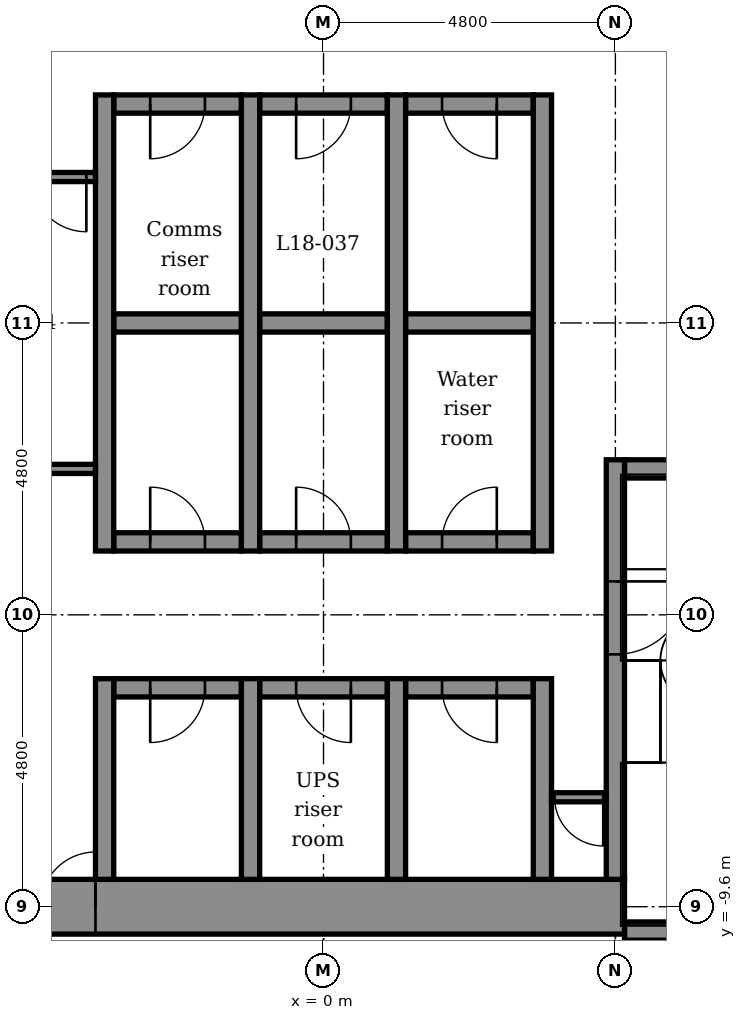
"""IFC4 building model, lengths in metres.
Left out: names, types, materials, properties, quantities, classifications, styles, units other than length and angle.
Written with IfcOpenShell. Run it as: python <this file> out.ifc"""

import sys

from ifc_helpers import new_model, si_unit, direction, frame, frame_2d, origin, place, context, subcontext, project, spatial, rectangle, extrude, element, fill, save


model = new_model("IFC4")
c1 = context("Model", 3, precision=1e-05, world=origin(), true_north=direction((0.0, 1.0)))
c2 = subcontext(c1, "Body", "Model", "MODEL_VIEW")
j1 = project(units=[si_unit("LENGTHUNIT", "METRE"), si_unit("PLANEANGLEUNIT", "RADIAN")], contexts=[c1])
p1 = place(None, origin())
s1 = spatial("IfcSite", under=j1, at=p1, CompositionType="ELEMENT")
p2 = place(p1, origin())
s2 = spatial("IfcBuilding", under=s1, at=p2, CompositionType="ELEMENT")
p3 = place(p2, frame((0.0, 0.0, 95.9)))
s3 = spatial("IfcBuildingStorey", under=s2, at=p3, CompositionType="ELEMENT", Elevation=95.9)
p4 = place(p3, frame((4.95, -10.0, -0.2), z_axis=(0.0, 0.0, 1.0), x_axis=(1.0, 0.0, 0.0)))
e1 = element("IfcWall", 1, at=p4, inside=s3, PredefinedType="STANDARD", context=c2, shape_type="SweptSolid", body=[
    extrude(rectangle(XDim=4.2, YDim=0.3, at=frame_2d((2.1, 0.0))), origin(), (0.0, 0.0, 1.0), 4.5),
])
p5 = place(p3, frame((-5.25, -9.6, -0.2), z_axis=(0.0, 0.0, 1.0), x_axis=(1.0, 0.0, 0.0)))
e2 = element("IfcWall", 2, at=p5, inside=s3, PredefinedType="SHEAR", context=c2, shape_type="SweptSolid", body=[
    extrude(rectangle(XDim=10.2, YDim=0.9, at=frame_2d((5.1, 0.0))), origin(), (0.0, 0.0, 1.0), 4.5),
])
p6 = place(p5, frame((0.6, 0.0, 0.2)))
e3 = element("IfcOpeningElement", 3, at=p6, cuts=e2, PredefinedType="OPENING", context=c2, shape_type="SweptSolid", body=[
    extrude(rectangle(XDim=0.9, YDim=2.1, at=frame_2d((0.45, 1.05))), frame((0.0, 0.46, 0.0), z_axis=(0.0, -1.0, 0.0), x_axis=(1.0, 0.0, 0.0)), (0.0, 0.0, 1.0), 0.92),
])
p7 = place(p3, frame((-3.45, -6.0, -0.2), z_axis=(0.0, 0.0, 1.0), x_axis=(1.0, 0.0, 0.0)))
e4 = element("IfcWall", 4, at=p7, inside=s3, PredefinedType="STANDARD", context=c2, shape_type="SweptSolid", body=[
    extrude(rectangle(XDim=2.1, YDim=0.3, at=frame_2d((1.05, 0.0))), origin(), (0.0, 0.0, 1.0), 4.5),
])
p8 = place(p7, frame((0.6, 0.0, 0.2)))
e5 = element("IfcOpeningElement", 5, at=p8, cuts=e4, PredefinedType="OPENING", context=c2, shape_type="SweptSolid", body=[
    extrude(rectangle(XDim=0.9, YDim=2.1, at=frame_2d((0.45, 1.05))), frame((0.0, 0.16, 0.0), z_axis=(0.0, -1.0, 0.0), x_axis=(1.0, 0.0, 0.0)), (0.0, 0.0, 1.0), 0.32),
])
p9 = place(p3, frame((-1.05, -6.0, -0.2), z_axis=(0.0, 0.0, 1.0), x_axis=(1.0, 0.0, 0.0)))
e6 = element("IfcWall", 6, at=p9, inside=s3, PredefinedType="STANDARD", context=c2, shape_type="SweptSolid", body=[
    extrude(rectangle(XDim=2.1, YDim=0.3, at=frame_2d((1.05, 0.0))), origin(), (0.0, 0.0, 1.0), 4.5),
])
p10 = place(p9, frame((0.6, 0.0, 0.2)))
e7 = element("IfcOpeningElement", 7, at=p10, cuts=e6, PredefinedType="OPENING", context=c2, shape_type="SweptSolid", body=[
    extrude(rectangle(XDim=0.9, YDim=2.1, at=frame_2d((0.45, 1.05))), frame((0.0, 0.16, 0.0), z_axis=(0.0, -1.0, 0.0), x_axis=(1.0, 0.0, 0.0)), (0.0, 0.0, 1.0), 0.32),
])
p11 = place(p3, frame((1.35, -6.0, -0.2), z_axis=(0.0, 0.0, 1.0), x_axis=(1.0, 0.0, 0.0)))
e8 = element("IfcWall", 8, at=p11, inside=s3, PredefinedType="STANDARD", context=c2, shape_type="SweptSolid", body=[
    extrude(rectangle(XDim=2.1, YDim=0.3, at=frame_2d((1.05, 0.0))), origin(), (0.0, 0.0, 1.0), 4.5),
])
p12 = place(p11, frame((0.6, 0.0, 0.2)))
e9 = element("IfcOpeningElement", 9, at=p12, cuts=e8, PredefinedType="OPENING", context=c2, shape_type="SweptSolid", body=[
    extrude(rectangle(XDim=0.9, YDim=2.1, at=frame_2d((0.45, 1.05))), frame((0.0, 0.16, 0.0), z_axis=(0.0, -1.0, 0.0), x_axis=(1.0, 0.0, 0.0)), (0.0, 0.0, 1.0), 0.32),
])
p13 = place(p3, frame((-3.45, -3.6, -0.2), z_axis=(0.0, 0.0, 1.0), x_axis=(1.0, 0.0, 0.0)))
e10 = element("IfcWall", 10, at=p13, inside=s3, PredefinedType="STANDARD", context=c2, shape_type="SweptSolid", body=[
    extrude(rectangle(XDim=2.1, YDim=0.3, at=frame_2d((1.05, 0.0))), origin(), (0.0, 0.0, 1.0), 4.5),
])
p14 = place(p13, frame((0.6, 0.0, 0.2)))
e11 = element("IfcOpeningElement", 11, at=p14, cuts=e10, PredefinedType="OPENING", context=c2, shape_type="SweptSolid", body=[
    extrude(rectangle(XDim=0.9, YDim=2.1, at=frame_2d((0.45, 1.05))), frame((0.0, 0.16, 0.0), z_axis=(0.0, -1.0, 0.0), x_axis=(1.0, 0.0, 0.0)), (0.0, 0.0, 1.0), 0.32),
])
p15 = place(p3, frame((-1.05, -3.6, -0.2), z_axis=(0.0, 0.0, 1.0), x_axis=(1.0, 0.0, 0.0)))
e12 = element("IfcWall", 12, at=p15, inside=s3, PredefinedType="STANDARD", context=c2, shape_type="SweptSolid", body=[
    extrude(rectangle(XDim=2.1, YDim=0.3, at=frame_2d((1.05, 0.0))), origin(), (0.0, 0.0, 1.0), 4.5),
])
p16 = place(p15, frame((0.6, 0.0, 0.2)))
e13 = element("IfcOpeningElement", 13, at=p16, cuts=e12, PredefinedType="OPENING", context=c2, shape_type="SweptSolid", body=[
    extrude(rectangle(XDim=0.9, YDim=2.1, at=frame_2d((0.45, 1.05))), frame((0.0, 0.16, 0.0), z_axis=(0.0, -1.0, 0.0), x_axis=(1.0, 0.0, 0.0)), (0.0, 0.0, 1.0), 0.32),
])
p17 = place(p3, frame((1.35, -3.6, -0.2), z_axis=(0.0, 0.0, 1.0), x_axis=(1.0, 0.0, 0.0)))
e14 = element("IfcWall", 14, at=p17, inside=s3, PredefinedType="STANDARD", context=c2, shape_type="SweptSolid", body=[
    extrude(rectangle(XDim=2.1, YDim=0.3, at=frame_2d((1.05, 0.0))), origin(), (0.0, 0.0, 1.0), 4.5),
])
p18 = place(p17, frame((0.6, 0.0, 0.2)))
e15 = element("IfcOpeningElement", 15, at=p18, cuts=e14, PredefinedType="OPENING", context=c2, shape_type="SweptSolid", body=[
    extrude(rectangle(XDim=0.9, YDim=2.1, at=frame_2d((0.45, 1.05))), frame((0.0, 0.16, 0.0), z_axis=(0.0, -1.0, 0.0), x_axis=(1.0, 0.0, 0.0)), (0.0, 0.0, 1.0), 0.32),
])
p19 = place(p3, frame((4.95, -2.4, -0.2), z_axis=(0.0, 0.0, 1.0), x_axis=(1.0, 0.0, 0.0)))
e16 = element("IfcWall", 16, at=p19, inside=s3, PredefinedType="STANDARD", context=c2, shape_type="SweptSolid", body=[
    extrude(rectangle(XDim=0.9, YDim=0.3, at=frame_2d((0.45, 0.0))), origin(), (0.0, 0.0, 1.0), 4.5),
])
p20 = place(p3, frame((-3.45, 0.0, -0.2), z_axis=(0.0, 0.0, 1.0), x_axis=(1.0, 0.0, 0.0)))
e17 = element("IfcWall", 17, at=p20, inside=s3, PredefinedType="STANDARD", context=c2, shape_type="SweptSolid", body=[
    extrude(rectangle(XDim=2.1, YDim=0.3, at=frame_2d((1.05, 0.0))), origin(), (0.0, 0.0, 1.0), 4.5),
])
p21 = place(p3, frame((-1.05, 0.0, -0.2), z_axis=(0.0, 0.0, 1.0), x_axis=(1.0, 0.0, 0.0)))
e18 = element("IfcWall", 18, at=p21, inside=s3, PredefinedType="STANDARD", context=c2, shape_type="SweptSolid", body=[
    extrude(rectangle(XDim=2.1, YDim=0.3, at=frame_2d((1.05, 0.0))), origin(), (0.0, 0.0, 1.0), 4.5),
])
p22 = place(p3, frame((1.35, 0.0, -0.2), z_axis=(0.0, 0.0, 1.0), x_axis=(1.0, 0.0, 0.0)))
e19 = element("IfcWall", 19, at=p22, inside=s3, PredefinedType="STANDARD", context=c2, shape_type="SweptSolid", body=[
    extrude(rectangle(XDim=2.1, YDim=0.3, at=frame_2d((1.05, 0.0))), origin(), (0.0, 0.0, 1.0), 4.5),
])
p23 = place(p3, frame((-3.45, 3.6, -0.2), z_axis=(0.0, 0.0, 1.0), x_axis=(1.0, 0.0, 0.0)))
e20 = element("IfcWall", 20, at=p23, inside=s3, PredefinedType="STANDARD", context=c2, shape_type="SweptSolid", body=[
    extrude(rectangle(XDim=2.1, YDim=0.3, at=frame_2d((1.05, 0.0))), origin(), (0.0, 0.0, 1.0), 4.5),
])
p24 = place(p23, frame((0.6, 0.0, 0.2)))
e21 = element("IfcOpeningElement", 21, at=p24, cuts=e20, PredefinedType="OPENING", context=c2, shape_type="SweptSolid", body=[
    extrude(rectangle(XDim=0.9, YDim=2.1, at=frame_2d((0.45, 1.05))), frame((0.0, 0.16, 0.0), z_axis=(0.0, -1.0, 0.0), x_axis=(1.0, 0.0, 0.0)), (0.0, 0.0, 1.0), 0.32),
])
p25 = place(p3, frame((-1.05, 3.6, -0.2), z_axis=(0.0, 0.0, 1.0), x_axis=(1.0, 0.0, 0.0)))
e22 = element("IfcWall", 22, at=p25, inside=s3, PredefinedType="STANDARD", context=c2, shape_type="SweptSolid", body=[
    extrude(rectangle(XDim=2.1, YDim=0.3, at=frame_2d((1.05, 0.0))), origin(), (0.0, 0.0, 1.0), 4.5),
])
p26 = place(p25, frame((0.6, 0.0, 0.2)))
e23 = element("IfcOpeningElement", 23, at=p26, cuts=e22, PredefinedType="OPENING", context=c2, shape_type="SweptSolid", body=[
    extrude(rectangle(XDim=0.9, YDim=2.1, at=frame_2d((0.45, 1.05))), frame((0.0, 0.16, 0.0), z_axis=(0.0, -1.0, 0.0), x_axis=(1.0, 0.0, 0.0)), (0.0, 0.0, 1.0), 0.32),
])
p27 = place(p3, frame((1.35, 3.6, -0.2), z_axis=(0.0, 0.0, 1.0), x_axis=(1.0, 0.0, 0.0)))
e24 = element("IfcWall", 24, at=p27, inside=s3, PredefinedType="STANDARD", context=c2, shape_type="SweptSolid", body=[
    extrude(rectangle(XDim=2.1, YDim=0.3, at=frame_2d((1.05, 0.0))), origin(), (0.0, 0.0, 1.0), 4.5),
])
p28 = place(p27, frame((0.6, 0.0, 0.2)))
e25 = element("IfcOpeningElement", 25, at=p28, cuts=e24, PredefinedType="OPENING", context=c2, shape_type="SweptSolid", body=[
    extrude(rectangle(XDim=0.9, YDim=2.1, at=frame_2d((0.45, 1.05))), frame((0.0, 0.16, 0.0), z_axis=(0.0, -1.0, 0.0), x_axis=(1.0, 0.0, 0.0)), (0.0, 0.0, 1.0), 0.32),
])
p29 = place(p3, frame((-3.6, -9.15, -0.2), z_axis=(0.0, 0.0, 1.0), x_axis=(0.0, 1.0, 0.0)))
e26 = element("IfcWall", 26, at=p29, inside=s3, PredefinedType="STANDARD", context=c2, shape_type="SweptSolid", body=[
    extrude(rectangle(XDim=3.3, YDim=0.3, at=frame_2d((1.65, 0.0))), origin(), (0.0, 0.0, 1.0), 4.5),
])
p30 = place(p3, frame((-3.6, -3.75, -0.2), z_axis=(0.0, 0.0, 1.0), x_axis=(0.0, 1.0, 0.0)))
e27 = element("IfcWall", 27, at=p30, inside=s3, PredefinedType="STANDARD", context=c2, shape_type="SweptSolid", body=[
    extrude(rectangle(XDim=7.5, YDim=0.3, at=frame_2d((3.75, 0.0))), origin(), (0.0, 0.0, 1.0), 4.5),
])
p31 = place(p3, frame((-1.2, -9.15, -0.2), z_axis=(0.0, 0.0, 1.0), x_axis=(0.0, 1.0, 0.0)))
e28 = element("IfcWall", 28, at=p31, inside=s3, PredefinedType="STANDARD", context=c2, shape_type="SweptSolid", body=[
    extrude(rectangle(XDim=3.3, YDim=0.3, at=frame_2d((1.65, 0.0))), origin(), (0.0, 0.0, 1.0), 4.5),
])
p32 = place(p3, frame((-1.2, -3.75, -0.2), z_axis=(0.0, 0.0, 1.0), x_axis=(0.0, 1.0, 0.0)))
e29 = element("IfcWall", 29, at=p32, inside=s3, PredefinedType="STANDARD", context=c2, shape_type="SweptSolid", body=[
    extrude(rectangle(XDim=7.5, YDim=0.3, at=frame_2d((3.75, 0.0))), origin(), (0.0, 0.0, 1.0), 4.5),
])
p33 = place(p3, frame((1.2, -9.15, -0.2), z_axis=(0.0, 0.0, 1.0), x_axis=(0.0, 1.0, 0.0)))
e30 = element("IfcWall", 30, at=p33, inside=s3, PredefinedType="STANDARD", context=c2, shape_type="SweptSolid", body=[
    extrude(rectangle(XDim=3.3, YDim=0.3, at=frame_2d((1.65, 0.0))), origin(), (0.0, 0.0, 1.0), 4.5),
])
p34 = place(p3, frame((1.2, -3.75, -0.2), z_axis=(0.0, 0.0, 1.0), x_axis=(0.0, 1.0, 0.0)))
e31 = element("IfcWall", 31, at=p34, inside=s3, PredefinedType="STANDARD", context=c2, shape_type="SweptSolid", body=[
    extrude(rectangle(XDim=7.5, YDim=0.3, at=frame_2d((3.75, 0.0))), origin(), (0.0, 0.0, 1.0), 4.5),
])
p35 = place(p3, frame((3.6, -9.15, -0.2), z_axis=(0.0, 0.0, 1.0), x_axis=(0.0, 1.0, 0.0)))
e32 = element("IfcWall", 32, at=p35, inside=s3, PredefinedType="STANDARD", context=c2, shape_type="SweptSolid", body=[
    extrude(rectangle(XDim=3.3, YDim=0.3, at=frame_2d((1.65, 0.0))), origin(), (0.0, 0.0, 1.0), 4.5),
])
p36 = place(p3, frame((3.6, -3.75, -0.2), z_axis=(0.0, 0.0, 1.0), x_axis=(0.0, 1.0, 0.0)))
e33 = element("IfcWall", 33, at=p36, inside=s3, PredefinedType="STANDARD", context=c2, shape_type="SweptSolid", body=[
    extrude(rectangle(XDim=7.5, YDim=0.3, at=frame_2d((3.75, 0.0))), origin(), (0.0, 0.0, 1.0), 4.5),
])
p37 = place(p3, frame((4.8, -9.15, -0.2), z_axis=(0.0, 0.0, 1.0), x_axis=(0.0, 1.0, 0.0)))
e34 = element("IfcWall", 34, at=p37, inside=s3, PredefinedType="STANDARD", context=c2, shape_type="SweptSolid", body=[
    extrude(rectangle(XDim=6.9, YDim=0.3, at=frame_2d((3.45, 0.0))), origin(), (0.0, 0.0, 1.0), 4.5),
])
p38 = place(p37, frame((3.7, 0.0, 0.2)))
e35 = element("IfcOpeningElement", 35, at=p38, cuts=e34, PredefinedType="OPENING", context=c2, shape_type="SweptSolid", body=[
    extrude(rectangle(XDim=1.2, YDim=2.1, at=frame_2d((0.6, 1.05))), frame((0.0, 0.16, 0.0), z_axis=(0.0, -1.0, 0.0), x_axis=(1.0, 0.0, 0.0)), (0.0, 0.0, 1.0), 0.32),
])
p39 = place(p3, frame((3.75, -7.8, 0.0), z_axis=(0.0, 0.0, 1.0), x_axis=(1.0, 0.0, 0.0)))
e36 = element("IfcWall", 36, at=p39, inside=s3, PredefinedType="PARTITIONING", context=c2, shape_type="SweptSolid", body=[
    extrude(rectangle(XDim=0.9, YDim=0.15, at=frame_2d((0.45, 0.0))), origin(), (0.0, 0.0, 1.0), 4.3),
])
p40 = place(p39, frame((0.05, 0.0, 0.0)))
e37 = element("IfcOpeningElement", 37, at=p40, cuts=e36, PredefinedType="OPENING", context=c2, shape_type="SweptSolid", body=[
    extrude(rectangle(XDim=0.8, YDim=2.1, at=frame_2d((0.4, 1.05))), frame((0.0, 0.085, 0.0), z_axis=(0.0, -1.0, 0.0), x_axis=(1.0, 0.0, 0.0)), (0.0, 0.0, 1.0), 0.17),
])
p41 = place(p3, frame((-4.95, 2.4, 0.0), z_axis=(0.0, 0.0, 1.0), x_axis=(1.0, 0.0, 0.0)))
e38 = element("IfcWall", 38, at=p41, inside=s3, PredefinedType="PARTITIONING", context=c2, shape_type="SweptSolid", body=[
    extrude(rectangle(XDim=1.2, YDim=0.15, at=frame_2d((0.6, 0.0))), origin(), (0.0, 0.0, 1.0), 4.3),
])
p42 = place(p41, frame((0.15, 0.0, 0.0)))
e39 = element("IfcOpeningElement", 39, at=p42, cuts=e38, PredefinedType="OPENING", context=c2, shape_type="SweptSolid", body=[
    extrude(rectangle(XDim=0.9, YDim=2.1, at=frame_2d((0.45, 1.05))), frame((0.0, 0.085, 0.0), z_axis=(0.0, -1.0, 0.0), x_axis=(1.0, 0.0, 0.0)), (0.0, 0.0, 1.0), 0.17),
])
p43 = place(p3, frame((-4.95, -2.4, 0.0), z_axis=(0.0, 0.0, 1.0), x_axis=(1.0, 0.0, 0.0)))
e40 = element("IfcWall", 40, at=p43, inside=s3, PredefinedType="PARTITIONING", context=c2, shape_type="SweptSolid", body=[
    extrude(rectangle(XDim=1.2, YDim=0.15, at=frame_2d((0.6, 0.0))), origin(), (0.0, 0.0, 1.0), 4.3),
])
p44 = place(p40, frame((0.8, 0.0, 0.0), z_axis=(0.0, 0.0, 1.0), x_axis=(-1.0, 0.0, 0.0)))
e41 = element("IfcDoor", 41, at=p44, inside=s3, OperationType="SINGLE_SWING_RIGHT", PredefinedType="DOOR", context=c2, shape_type="SweptSolid", body=[
    extrude(rectangle(XDim=0.8, YDim=2.1, at=frame_2d((0.4, 1.05))), frame((0.0, 0.025, 0.0), z_axis=(0.0, -1.0, 0.0), x_axis=(1.0, 0.0, 0.0)), (0.0, 0.0, 1.0), 0.05),
])
fill(e37, e41)
p45 = place(p38, frame((1.2, 0.0, 0.0), z_axis=(0.0, 0.0, 1.0), x_axis=(-1.0, 0.0, 0.0)))
e42 = element("IfcDoor", 42, at=p45, inside=s3, OperationType="SINGLE_SWING_RIGHT", PredefinedType="DOOR", context=c2, shape_type="SweptSolid", body=[
    extrude(rectangle(XDim=1.2, YDim=2.1, at=frame_2d((0.6, 1.05))), frame((0.0, 0.025, 0.0), z_axis=(0.0, -1.0, 0.0), x_axis=(1.0, 0.0, 0.0)), (0.0, 0.0, 1.0), 0.05),
])
fill(e35, e42)
p46 = place(p24, frame((0.9, 0.0, 0.0), z_axis=(0.0, 0.0, 1.0), x_axis=(-1.0, 0.0, 0.0)))
e43 = element("IfcDoor", 43, at=p46, inside=s3, OperationType="SINGLE_SWING_LEFT", PredefinedType="DOOR", context=c2, shape_type="SweptSolid", body=[
    extrude(rectangle(XDim=0.9, YDim=2.1, at=frame_2d((0.45, 1.05))), frame((0.0, 0.025, 0.0), z_axis=(0.0, -1.0, 0.0), x_axis=(1.0, 0.0, 0.0)), (0.0, 0.0, 1.0), 0.05),
])
fill(e21, e43)
p47 = place(p26, frame((0.9, 0.0, 0.0), z_axis=(0.0, 0.0, 1.0), x_axis=(-1.0, 0.0, 0.0)))
e44 = element("IfcDoor", 44, at=p47, inside=s3, OperationType="SINGLE_SWING_LEFT", PredefinedType="DOOR", context=c2, shape_type="SweptSolid", body=[
    extrude(rectangle(XDim=0.9, YDim=2.1, at=frame_2d((0.45, 1.05))), frame((0.0, 0.025, 0.0), z_axis=(0.0, -1.0, 0.0), x_axis=(1.0, 0.0, 0.0)), (0.0, 0.0, 1.0), 0.05),
])
fill(e23, e44)
p48 = place(p28, frame((0.9, 0.0, 0.0), z_axis=(0.0, 0.0, 1.0), x_axis=(-1.0, 0.0, 0.0)))
e45 = element("IfcDoor", 45, at=p48, inside=s3, OperationType="SINGLE_SWING_RIGHT", PredefinedType="DOOR", context=c2, shape_type="SweptSolid", body=[
    extrude(rectangle(XDim=0.9, YDim=2.1, at=frame_2d((0.45, 1.05))), frame((0.0, 0.025, 0.0), z_axis=(0.0, -1.0, 0.0), x_axis=(1.0, 0.0, 0.0)), (0.0, 0.0, 1.0), 0.05),
])
fill(e25, e45)
p49 = place(p14, origin())
e46 = element("IfcDoor", 46, at=p49, inside=s3, OperationType="SINGLE_SWING_LEFT", PredefinedType="DOOR", context=c2, shape_type="SweptSolid", body=[
    extrude(rectangle(XDim=0.9, YDim=2.1, at=frame_2d((0.45, 1.05))), frame((0.0, 0.025, 0.0), z_axis=(0.0, -1.0, 0.0), x_axis=(1.0, 0.0, 0.0)), (0.0, 0.0, 1.0), 0.05),
])
fill(e11, e46)
p50 = place(p16, origin())
e47 = element("IfcDoor", 47, at=p50, inside=s3, OperationType="SINGLE_SWING_LEFT", PredefinedType="DOOR", context=c2, shape_type="SweptSolid", body=[
    extrude(rectangle(XDim=0.9, YDim=2.1, at=frame_2d((0.45, 1.05))), frame((0.0, 0.025, 0.0), z_axis=(0.0, -1.0, 0.0), x_axis=(1.0, 0.0, 0.0)), (0.0, 0.0, 1.0), 0.05),
])
fill(e13, e47)
p51 = place(p18, origin())
e48 = element("IfcDoor", 48, at=p51, inside=s3, OperationType="SINGLE_SWING_RIGHT", PredefinedType="DOOR", context=c2, shape_type="SweptSolid", body=[
    extrude(rectangle(XDim=0.9, YDim=2.1, at=frame_2d((0.45, 1.05))), frame((0.0, 0.025, 0.0), z_axis=(0.0, -1.0, 0.0), x_axis=(1.0, 0.0, 0.0)), (0.0, 0.0, 1.0), 0.05),
])
fill(e15, e48)
p52 = place(p8, frame((0.9, 0.0, 0.0), z_axis=(0.0, 0.0, 1.0), x_axis=(-1.0, 0.0, 0.0)))
e49 = element("IfcDoor", 49, at=p52, inside=s3, OperationType="SINGLE_SWING_LEFT", PredefinedType="DOOR", context=c2, shape_type="SweptSolid", body=[
    extrude(rectangle(XDim=0.9, YDim=2.1, at=frame_2d((0.45, 1.05))), frame((0.0, 0.025, 0.0), z_axis=(0.0, -1.0, 0.0), x_axis=(1.0, 0.0, 0.0)), (0.0, 0.0, 1.0), 0.05),
])
fill(e5, e49)
p53 = place(p10, frame((0.9, 0.0, 0.0), z_axis=(0.0, 0.0, 1.0), x_axis=(-1.0, 0.0, 0.0)))
e50 = element("IfcDoor", 50, at=p53, inside=s3, OperationType="SINGLE_SWING_RIGHT", PredefinedType="DOOR", context=c2, shape_type="SweptSolid", body=[
    extrude(rectangle(XDim=0.9, YDim=2.1, at=frame_2d((0.45, 1.05))), frame((0.0, 0.025, 0.0), z_axis=(0.0, -1.0, 0.0), x_axis=(1.0, 0.0, 0.0)), (0.0, 0.0, 1.0), 0.05),
])
fill(e7, e50)
p54 = place(p12, frame((0.9, 0.0, 0.0), z_axis=(0.0, 0.0, 1.0), x_axis=(-1.0, 0.0, 0.0)))
e51 = element("IfcDoor", 51, at=p54, inside=s3, OperationType="SINGLE_SWING_RIGHT", PredefinedType="DOOR", context=c2, shape_type="SweptSolid", body=[
    extrude(rectangle(XDim=0.9, YDim=2.1, at=frame_2d((0.45, 1.05))), frame((0.0, 0.025, 0.0), z_axis=(0.0, -1.0, 0.0), x_axis=(1.0, 0.0, 0.0)), (0.0, 0.0, 1.0), 0.05),
])
fill(e9, e51)
p55 = place(p6, origin())
e52 = element("IfcDoor", 52, at=p55, inside=s3, OperationType="SINGLE_SWING_RIGHT", PredefinedType="DOOR", context=c2, shape_type="SweptSolid", body=[
    extrude(rectangle(XDim=0.9, YDim=2.1, at=frame_2d((0.45, 1.05))), frame((0.0, 0.025, 0.0), z_axis=(0.0, -1.0, 0.0), x_axis=(1.0, 0.0, 0.0)), (0.0, 0.0, 1.0), 0.05),
])
fill(e3, e52)
p56 = place(p42, frame((0.9, 0.0, 0.0), z_axis=(0.0, 0.0, 1.0), x_axis=(-1.0, 0.0, 0.0)))
e53 = element("IfcDoor", 53, at=p56, inside=s3, OperationType="SINGLE_SWING_RIGHT", PredefinedType="DOOR", context=c2, shape_type="SweptSolid", body=[
    extrude(rectangle(XDim=0.9, YDim=2.1, at=frame_2d((0.45, 1.05))), frame((0.0, 0.025, 0.0), z_axis=(0.0, -1.0, 0.0), x_axis=(1.0, 0.0, 0.0)), (0.0, 0.0, 1.0), 0.05),
])
fill(e39, e53)
save(model, sys.argv[1])
